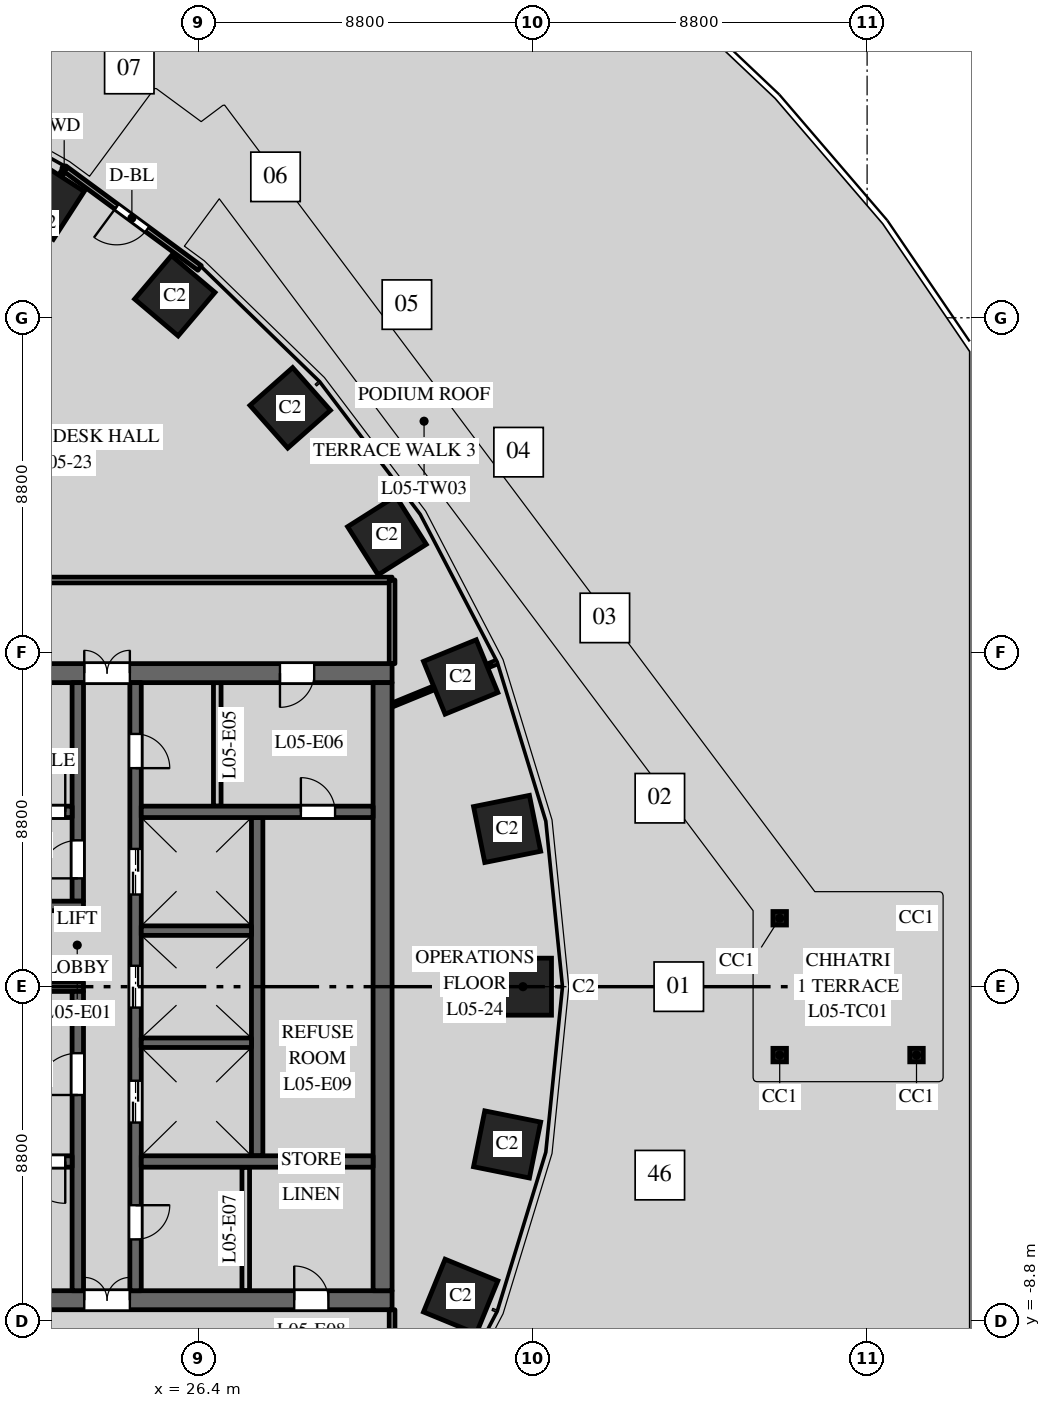
"""IFC4 building model, lengths in metres.
Left out: names, types, materials, properties, quantities, classifications, styles, units other than length and angle.
Written with IfcOpenShell. Run it as: python <this file> out.ifc"""

import sys

from ifc_helpers import new_model, si_unit, direction, frame, frame_2d, origin, origin_2d, place, context, subcontext, project, spatial, rectangle, hollow_circle, extrude, element, fill, save


model = new_model("IFC4")
c1 = context("Model", 3, precision=1e-05, world=origin(), true_north=direction((0.0, 1.0)))
c2 = subcontext(c1, "Body", "Model", "MODEL_VIEW")
j1 = project(units=[si_unit("LENGTHUNIT", "METRE"), si_unit("PLANEANGLEUNIT", "RADIAN")], contexts=[c1])
p1 = place(None, origin())
s1 = spatial("IfcSite", under=j1, at=p1, CompositionType="ELEMENT")
p2 = place(p1, origin())
s2 = spatial("IfcBuilding", under=s1, at=p2, CompositionType="ELEMENT")
p3 = place(p2, frame((0.0, 0.0, 30.5)))
s3 = spatial("IfcBuildingStorey", under=s2, at=p3, CompositionType="ELEMENT", Elevation=30.5)
for number, where, z_axis, x_axis in (
    (1, (34.945, 0.0, 0.0), (0.0, 0.0, 1.0), (0.0, 1.0, 0.0)),
    (2, (34.527, 4.151, 0.0), (0.0, 0.0, 1.0), (-0.197, 0.98, 0.0)),
    (3, (33.305, 8.149, 0.0), (0.0, 0.0, 1.0), (-0.379, 0.925, 0.0)),
    (4, (31.365, 11.871, 0.0), (0.0, 0.0, 1.0), (-0.535, 0.845, 0.0)),
    (5, (28.819, 15.23, 0.0), (0.0, 0.0, 1.0), (-0.663, 0.749, 0.0)),
    (6, (25.783, 18.18, 0.0), (0.0, 0.0, 1.0), (-0.763, 0.646, 0.0)),
    (7, (22.362, 20.7, 0.0), (0.0, 0.0, 1.0), (-0.84, 0.542, 0.0)),
    (8, (33.305, -8.149, 0.0), (0.0, 0.0, 1.0), (0.379, 0.925, 0.0)),
    (9, (34.527, -4.151, 0.0), (0.0, 0.0, 1.0), (0.197, 0.98, 0.0)),
):
    element("IfcColumn", number, at=place(p3, frame(where, z_axis=z_axis, x_axis=x_axis)), inside=s3, PredefinedType="COLUMN", context=c2, shape_type="SweptSolid", body=[
        extrude(rectangle(XDim=1.5, YDim=1.5, at=origin_2d()), origin(), (0.0, 0.0, 1.0), 4.0),
    ])
p4 = place(p3, frame((16.5, 8.25, 0.0), z_axis=(0.0, 0.0, 1.0), x_axis=(1.0, 0.0, 0.0)))
e10 = element("IfcWall", 10, at=p4, inside=s3, PredefinedType="SHEAR", context=c2, shape_type="SweptSolid", body=[
    extrude(rectangle(XDim=15.0, YDim=0.5, at=frame_2d((7.5, 0.0))), origin(), (0.0, 0.0, 1.0), 3.7),
])
p5 = place(p4, frame((6.9, 0.0, 0.0)))
e11 = element("IfcOpeningElement", 11, at=p5, cuts=e10, PredefinedType="OPENING", context=c2, shape_type="SweptSolid", body=[
    extrude(rectangle(XDim=1.2, YDim=2.1, at=frame_2d((0.6, 1.05))), frame((0.0, 0.26, 0.0), z_axis=(0.0, -1.0, 0.0), x_axis=(1.0, 0.0, 0.0)), (0.0, 0.0, 1.0), 0.52),
])
p6 = place(p4, frame((12.05, 0.0, 0.0)))
e12 = element("IfcOpeningElement", 12, at=p6, cuts=e10, PredefinedType="OPENING", context=c2, shape_type="SweptSolid", body=[
    extrude(rectangle(XDim=0.9, YDim=2.1, at=frame_2d((0.45, 1.05))), frame((0.0, 0.26, 0.0), z_axis=(0.0, -1.0, 0.0), x_axis=(1.0, 0.0, 0.0)), (0.0, 0.0, 1.0), 0.52),
])
p7 = place(p3, frame((16.5, -8.25, 0.0), z_axis=(0.0, 0.0, 1.0), x_axis=(1.0, 0.0, 0.0)))
e13 = element("IfcWall", 13, at=p7, inside=s3, PredefinedType="SHEAR", context=c2, shape_type="SweptSolid", body=[
    extrude(rectangle(XDim=15.0, YDim=0.5, at=frame_2d((7.5, 0.0))), origin(), (0.0, 0.0, 1.0), 3.7),
])
p8 = place(p7, frame((6.9, 0.0, 0.0)))
e14 = element("IfcOpeningElement", 14, at=p8, cuts=e13, PredefinedType="OPENING", context=c2, shape_type="SweptSolid", body=[
    extrude(rectangle(XDim=1.2, YDim=2.1, at=frame_2d((0.6, 1.05))), frame((0.0, 0.26, 0.0), z_axis=(0.0, -1.0, 0.0), x_axis=(1.0, 0.0, 0.0)), (0.0, 0.0, 1.0), 0.52),
])
p9 = place(p7, frame((12.425, 0.0, 0.0)))
e15 = element("IfcOpeningElement", 15, at=p9, cuts=e13, PredefinedType="OPENING", context=c2, shape_type="SweptSolid", body=[
    extrude(rectangle(XDim=0.9, YDim=2.1, at=frame_2d((0.45, 1.05))), frame((0.0, 0.26, 0.0), z_axis=(0.0, -1.0, 0.0), x_axis=(1.0, 0.0, 0.0)), (0.0, 0.0, 1.0), 0.52),
])
p10 = place(p3, frame((27.95, -4.45, 0.0), z_axis=(0.0, 0.0, 1.0), x_axis=(0.0, 1.0, 0.0)))
e16 = element("IfcWall", 16, at=p10, inside=s3, PredefinedType="SHEAR", context=c2, shape_type="SweptSolid", body=[
    extrude(rectangle(XDim=8.9, YDim=0.3, at=frame_2d((4.45, 0.0))), origin(), (0.0, 0.0, 1.0), 3.7),
])
p11 = place(p3, frame((24.75, -8.0, 0.0), z_axis=(0.0, 0.0, 1.0), x_axis=(0.0, 1.0, 0.0)))
e17 = element("IfcWall", 17, at=p11, inside=s3, PredefinedType="SHEAR", context=c2, shape_type="SweptSolid", body=[
    extrude(rectangle(XDim=16.0, YDim=0.3, at=frame_2d((8.0, 0.0))), origin(), (0.0, 0.0, 1.0), 3.7),
])
p12 = place(p11, frame((4.425, 0.0, 0.0)))
e18 = element("IfcOpeningElement", 18, at=p12, cuts=e17, PredefinedType="OPENING", context=c2, shape_type="SweptSolid", body=[
    extrude(rectangle(XDim=1.1, YDim=2.1, at=frame_2d((0.55, 1.05))), frame((0.0, 0.16, 0.0), z_axis=(0.0, -1.0, 0.0), x_axis=(1.0, 0.0, 0.0)), (0.0, 0.0, 1.0), 0.32),
])
p13 = place(p11, frame((7.45, 0.0, 0.0)))
e19 = element("IfcOpeningElement", 19, at=p13, cuts=e17, PredefinedType="OPENING", context=c2, shape_type="SweptSolid", body=[
    extrude(rectangle(XDim=1.1, YDim=2.1, at=frame_2d((0.55, 1.05))), frame((0.0, 0.16, 0.0), z_axis=(0.0, -1.0, 0.0), x_axis=(1.0, 0.0, 0.0)), (0.0, 0.0, 1.0), 0.32),
])
p14 = place(p11, frame((10.425, 0.0, 0.0)))
e20 = element("IfcOpeningElement", 20, at=p14, cuts=e17, PredefinedType="OPENING", context=c2, shape_type="SweptSolid", body=[
    extrude(rectangle(XDim=1.2, YDim=2.1, at=frame_2d((0.6, 1.05))), frame((0.0, 0.16, 0.0), z_axis=(0.0, -1.0, 0.0), x_axis=(1.0, 0.0, 0.0)), (0.0, 0.0, 1.0), 0.32),
])
p15 = place(p11, frame((13.75, 0.0, 0.0)))
e21 = element("IfcOpeningElement", 21, at=p15, cuts=e17, PredefinedType="OPENING", context=c2, shape_type="SweptSolid", body=[
    extrude(rectangle(XDim=0.9, YDim=2.1, at=frame_2d((0.45, 1.05))), frame((0.0, 0.16, 0.0), z_axis=(0.0, -1.0, 0.0), x_axis=(1.0, 0.0, 0.0)), (0.0, 0.0, 1.0), 0.32),
])
p16 = place(p11, frame((1.35, 0.0, 0.0)))
e22 = element("IfcOpeningElement", 22, at=p16, cuts=e17, PredefinedType="OPENING", context=c2, shape_type="SweptSolid", body=[
    extrude(rectangle(XDim=0.9, YDim=2.1, at=frame_2d((0.45, 1.05))), frame((0.0, 0.16, 0.0), z_axis=(0.0, -1.0, 0.0), x_axis=(1.0, 0.0, 0.0)), (0.0, 0.0, 1.0), 0.32),
])
p17 = place(p3, frame((20.1, 0.0, 0.0), z_axis=(0.0, 0.0, 1.0), x_axis=(1.0, 0.0, 0.0)))
e23 = element("IfcWall", 23, at=p17, inside=s3, PredefinedType="SHEAR", context=c2, shape_type="SweptSolid", body=[
    extrude(rectangle(XDim=3.28, YDim=0.25, at=frame_2d((1.64, 0.0))), origin(), (0.0, 0.0, 1.0), 3.7),
])
p18 = place(p3, frame((31.25, -8.0, 0.0), z_axis=(0.0, 0.0, 1.0), x_axis=(0.0, 1.0, 0.0)))
e24 = element("IfcWall", 24, at=p18, inside=s3, PredefinedType="SHEAR", context=c2, shape_type="SweptSolid", body=[
    extrude(rectangle(XDim=16.0, YDim=0.5, at=frame_2d((8.0, 0.0))), origin(), (0.0, 0.0, 1.0), 3.7),
])
p19 = place(p3, frame((24.9, 4.6, 0.0), z_axis=(0.0, 0.0, 1.0), x_axis=(1.0, 0.0, 0.0)))
e25 = element("IfcWall", 25, at=p19, inside=s3, PredefinedType="SHEAR", context=c2, shape_type="SweptSolid", body=[
    extrude(rectangle(XDim=6.1, YDim=0.3, at=frame_2d((3.05, 0.0))), origin(), (0.0, 0.0, 1.0), 3.7),
])
p20 = place(p19, frame((4.2, 0.0, 0.0)))
e26 = element("IfcOpeningElement", 26, at=p20, cuts=e25, PredefinedType="OPENING", context=c2, shape_type="SweptSolid", body=[
    extrude(rectangle(XDim=0.9, YDim=2.1, at=frame_2d((0.45, 1.05))), frame((0.0, 0.16, 0.0), z_axis=(0.0, -1.0, 0.0), x_axis=(1.0, 0.0, 0.0)), (0.0, 0.0, 1.0), 0.32),
])
for number, where, z_axis, x_axis in (
    (27, (26.9, 4.75, 0.0), (0.0, 0.0, 1.0), (0.0, 1.0, 0.0)),
    (28, (27.65, -8.0, 0.0), (0.0, 0.0, 1.0), (0.0, 1.0, 0.0)),
):
    element("IfcWall", number, at=place(p3, frame(where, z_axis=z_axis, x_axis=x_axis)), inside=s3, PredefinedType="PARTITIONING", context=c2, shape_type="SweptSolid", body=[
        extrude(rectangle(XDim=3.25, YDim=0.2, at=frame_2d((1.625, 0.0))), origin(), (0.0, 0.0, 1.0), 3.7),
    ])
p21 = place(p3, frame((24.9, -4.6, 0.0), z_axis=(0.0, 0.0, 1.0), x_axis=(1.0, 0.0, 0.0)))
e29 = element("IfcWall", 29, at=p21, inside=s3, PredefinedType="SHEAR", context=c2, shape_type="SweptSolid", body=[
    extrude(rectangle(XDim=6.1, YDim=0.3, at=frame_2d((3.05, 0.0))), origin(), (0.0, 0.0, 1.0), 3.7),
])
for number, where, z_axis, x_axis in (
    (30, (24.9, -1.475, 0.0), (0.0, 0.0, 1.0), (1.0, 0.0, 0.0)),
    (31, (24.9, 1.475, 0.0), (0.0, 0.0, 1.0), (1.0, 0.0, 0.0)),
):
    element("IfcWall", number, at=place(p3, frame(where, z_axis=z_axis, x_axis=x_axis)), inside=s3, PredefinedType="SHEAR", context=c2, shape_type="SweptSolid", body=[
        extrude(rectangle(XDim=2.9, YDim=0.25, at=frame_2d((1.45, 0.0))), origin(), (0.0, 0.0, 1.0), 3.7),
    ])
p22 = place(p3, frame((23.23, 2.25, 0.0), z_axis=(0.0, 0.0, 1.0), x_axis=(0.0, 1.0, 0.0)))
e32 = element("IfcWall", 32, at=p22, inside=s3, PredefinedType="SHEAR", context=c2, shape_type="SweptSolid", body=[
    extrude(rectangle(XDim=5.75, YDim=0.3, at=frame_2d((2.875, 0.0))), origin(), (0.0, 0.0, 1.0), 3.7),
])
p23 = place(p22, frame((0.6, 0.0, 0.0)))
e33 = element("IfcOpeningElement", 33, at=p23, cuts=e32, PredefinedType="OPENING", context=c2, shape_type="SweptSolid", body=[
    extrude(rectangle(XDim=1.0, YDim=2.1, at=frame_2d((0.5, 1.05))), frame((0.0, 0.16, 0.0), z_axis=(0.0, -1.0, 0.0), x_axis=(1.0, 0.0, 0.0)), (0.0, 0.0, 1.0), 0.32),
])
p24 = place(p3, frame((23.23, -8.0, 0.0), z_axis=(0.0, 0.0, 1.0), x_axis=(0.0, 1.0, 0.0)))
e34 = element("IfcWall", 34, at=p24, inside=s3, PredefinedType="SHEAR", context=c2, shape_type="SweptSolid", body=[
    extrude(rectangle(XDim=7.875, YDim=0.3, at=frame_2d((3.938, 0.0))), origin(), (0.0, 0.0, 1.0), 3.7),
])
p25 = place(p24, frame((5.15, 0.0, 0.0)))
e35 = element("IfcOpeningElement", 35, at=p25, cuts=e34, PredefinedType="OPENING", context=c2, shape_type="SweptSolid", body=[
    extrude(rectangle(XDim=1.1, YDim=2.1, at=frame_2d((0.55, 1.05))), frame((0.0, 0.16, 0.0), z_axis=(0.0, -1.0, 0.0), x_axis=(1.0, 0.0, 0.0)), (0.0, 0.0, 1.0), 0.32),
])
p26 = place(p3, frame((16.9, 4.6, 0.0), z_axis=(0.0, 0.0, 1.0), x_axis=(1.0, 0.0, 0.0)))
e36 = element("IfcWall", 36, at=p26, inside=s3, PredefinedType="SHEAR", context=c2, shape_type="SweptSolid", body=[
    extrude(rectangle(XDim=6.18, YDim=0.3, at=frame_2d((3.09, 0.0))), origin(), (0.0, 0.0, 1.0), 3.7),
])
p27 = place(p26, frame((4.9, 0.0, 0.0)))
e37 = element("IfcOpeningElement", 37, at=p27, cuts=e36, PredefinedType="OPENING", context=c2, shape_type="SweptSolid", body=[
    extrude(rectangle(XDim=1.1, YDim=2.1, at=frame_2d((0.55, 1.05))), frame((0.0, 0.16, 0.0), z_axis=(0.0, -1.0, 0.0), x_axis=(1.0, 0.0, 0.0)), (0.0, 0.0, 1.0), 0.32),
])
p28 = place(p3, frame((16.9, -4.6, 0.0), z_axis=(0.0, 0.0, 1.0), x_axis=(1.0, 0.0, 0.0)))
e38 = element("IfcWall", 38, at=p28, inside=s3, PredefinedType="SHEAR", context=c2, shape_type="SweptSolid", body=[
    extrude(rectangle(XDim=6.18, YDim=0.3, at=frame_2d((3.09, 0.0))), origin(), (0.0, 0.0, 1.0), 3.7),
])
p29 = place(p28, frame((4.9, 0.0, 0.0)))
e39 = element("IfcOpeningElement", 39, at=p29, cuts=e38, PredefinedType="OPENING", context=c2, shape_type="SweptSolid", body=[
    extrude(rectangle(XDim=1.1, YDim=2.1, at=frame_2d((0.55, 1.05))), frame((0.0, 0.16, 0.0), z_axis=(0.0, -1.0, 0.0), x_axis=(1.0, 0.0, 0.0)), (0.0, 0.0, 1.0), 0.32),
])
p30 = place(p3, frame((20.85, 2.125, 0.0), z_axis=(0.0, 0.0, 1.0), x_axis=(1.0, 0.0, 0.0)))
e40 = element("IfcWall", 40, at=p30, inside=s3, PredefinedType="SHEAR", context=c2, shape_type="SweptSolid", body=[
    extrude(rectangle(XDim=2.53, YDim=0.25, at=frame_2d((1.265, 0.0))), origin(), (0.0, 0.0, 1.0), 3.7),
])
p31 = place(p3, frame((26.435, 18.911, 0.0), z_axis=(0.0, 0.0, 1.0), x_axis=(-0.805154287598, 0.593065403782, 0.0)))
e41 = element("IfcWall", 41, at=p31, inside=s3, PredefinedType="STANDARD", context=c2, shape_type="SweptSolid", body=[
    extrude(rectangle(XDim=4.425, YDim=0.15, at=frame_2d((2.212, 0.0))), origin(), (0.0, 0.0, 1.0), 3.7),
])
p32 = place(p31, frame((1.712, 0.0, 0.0)))
e42 = element("IfcOpeningElement", 42, at=p32, cuts=e41, PredefinedType="OPENING", context=c2, shape_type="SweptSolid", body=[
    extrude(rectangle(XDim=1.0, YDim=2.4, at=frame_2d((0.5, 1.2))), frame((0.0, 0.085, 0.0), z_axis=(0.0, -1.0, 0.0), x_axis=(1.0, 0.0, 0.0)), (0.0, 0.0, 1.0), 0.17),
])
for number, where, z_axis, x_axis in (
    (43, (41.7, -1.8, 0.45), (0.0, 0.0, 1.0), (1.0, 0.0, 0.0)),
    (44, (45.3, -1.8, 0.45), (0.0, 0.0, 1.0), (1.0, 0.0, 0.0)),
    (45, (45.3, 1.8, 0.45), (0.0, 0.0, 1.0), (1.0, 0.0, 0.0)),
    (46, (41.7, 1.8, 0.45), (0.0, 0.0, 1.0), (1.0, 0.0, 0.0)),
):
    element("IfcColumn", number, at=place(p3, frame(where, z_axis=z_axis, x_axis=x_axis)), inside=s3, PredefinedType="COLUMN", context=c2, shape_type="SweptSolid", body=[
        extrude(hollow_circle(Radius=0.178, WallThickness=0.016, at=origin_2d()), origin(), (0.0, 0.0, 1.0), 3.55),
    ])
p33 = place(p3, frame((16.5, 10.7, 0.0), z_axis=(0.0, 0.0, 1.0), x_axis=(1.0, 0.0, 0.0)))
e47 = element("IfcWall", 47, at=p33, inside=s3, PredefinedType="PARTITIONING", context=c2, shape_type="SweptSolid", body=[
    extrude(rectangle(XDim=15.0, YDim=0.15, at=frame_2d((7.5, 0.0))), origin(), (0.0, 0.0, 1.0), 2.75),
])
p34 = place(p33, frame((0.6, 0.0, 0.0)))
e48 = element("IfcOpeningElement", 48, at=p34, cuts=e47, PredefinedType="OPENING", context=c2, shape_type="SweptSolid", body=[
    extrude(rectangle(XDim=1.0, YDim=2.1, at=frame_2d((0.5, 1.05))), frame((0.0, 0.085, 0.0), z_axis=(0.0, -1.0, 0.0), x_axis=(1.0, 0.0, 0.0)), (0.0, 0.0, 1.0), 0.17),
])
p35 = place(p3, frame((16.575, 11.733, 0.0), z_axis=(0.0, 0.0, 1.0), x_axis=(0.54222594427, 0.840232720953, 0.0)))
e49 = element("IfcWall", 49, at=p35, inside=s3, PredefinedType="PARTITIONING", context=c2, shape_type="SweptSolid", body=[
    extrude(rectangle(XDim=11.674, YDim=0.1, at=frame_2d((5.837, 0.0))), origin(), (0.0, 0.0, 1.0), 3.7),
])
p36 = place(p3, frame((31.5, -10.7, 0.0), z_axis=(0.0, 0.0, 1.0), x_axis=(0.0, 1.0, 0.0)))
e50 = element("IfcWall", 50, at=p36, inside=s3, PredefinedType="PARTITIONING", context=c2, shape_type="SweptSolid", body=[
    extrude(rectangle(XDim=2.2, YDim=0.15, at=frame_2d((1.1, 0.0))), origin(), (0.0, 0.0, 1.0), 2.85),
])
p37 = place(p3, frame((31.5, 7.41, 0.0), z_axis=(0.0, 0.0, 1.0), x_axis=(0.925344112436, 0.379128307542, 0.0)))
e51 = element("IfcWall", 51, at=p37, inside=s3, PredefinedType="PARTITIONING", context=c2, shape_type="SweptSolid", body=[
    extrude(rectangle(XDim=2.954, YDim=0.1, at=frame_2d((1.477, 0.0))), origin(), (0.0, 0.0, 1.0), 3.7),
])
p38 = place(p3, frame((31.5, 8.5, 0.0), z_axis=(0.0, 0.0, 1.0), x_axis=(0.0, 1.0, 0.0)))
e52 = element("IfcWall", 52, at=p38, inside=s3, PredefinedType="PARTITIONING", context=c2, shape_type="SweptSolid", body=[
    extrude(rectangle(XDim=2.2, YDim=0.15, at=frame_2d((1.1, 0.0))), origin(), (0.0, 0.0, 1.0), 2.85),
])
p39 = place(p12, origin())
e53 = element("IfcDoor", 53, at=p39, inside=s3, OperationType="DOUBLE_DOOR_SLIDING", PredefinedType="DOOR", context=c2, shape_type="SweptSolid", body=[
    extrude(rectangle(XDim=1.1, YDim=2.1, at=frame_2d((0.55, 1.05))), frame((0.0, 0.025, 0.0), z_axis=(0.0, -1.0, 0.0), x_axis=(1.0, 0.0, 0.0)), (0.0, 0.0, 1.0), 0.05),
])
fill(e18, e53)
p40 = place(p13, origin())
e54 = element("IfcDoor", 54, at=p40, inside=s3, OperationType="DOUBLE_DOOR_SLIDING", PredefinedType="DOOR", context=c2, shape_type="SweptSolid", body=[
    extrude(rectangle(XDim=1.1, YDim=2.1, at=frame_2d((0.55, 1.05))), frame((0.0, 0.025, 0.0), z_axis=(0.0, -1.0, 0.0), x_axis=(1.0, 0.0, 0.0)), (0.0, 0.0, 1.0), 0.05),
])
fill(e19, e54)
p41 = place(p14, origin())
e55 = element("IfcDoor", 55, at=p41, inside=s3, OperationType="DOUBLE_DOOR_SLIDING", PredefinedType="DOOR", context=c2, shape_type="SweptSolid", body=[
    extrude(rectangle(XDim=1.2, YDim=2.1, at=frame_2d((0.6, 1.05))), frame((0.0, 0.025, 0.0), z_axis=(0.0, -1.0, 0.0), x_axis=(1.0, 0.0, 0.0)), (0.0, 0.0, 1.0), 0.05),
])
fill(e20, e55)
p42 = place(p27, origin())
e56 = element("IfcDoor", 56, at=p42, inside=s3, OperationType="SINGLE_SWING_LEFT", PredefinedType="DOOR", context=c2, shape_type="SweptSolid", body=[
    extrude(rectangle(XDim=1.1, YDim=2.1, at=frame_2d((0.55, 1.05))), frame((0.0, 0.025, 0.0), z_axis=(0.0, -1.0, 0.0), x_axis=(1.0, 0.0, 0.0)), (0.0, 0.0, 1.0), 0.05),
])
fill(e37, e56)
p43 = place(p29, origin())
e57 = element("IfcDoor", 57, at=p43, inside=s3, OperationType="SINGLE_SWING_RIGHT", PredefinedType="DOOR", context=c2, shape_type="SweptSolid", body=[
    extrude(rectangle(XDim=1.1, YDim=2.1, at=frame_2d((0.55, 1.05))), frame((0.0, 0.025, 0.0), z_axis=(0.0, -1.0, 0.0), x_axis=(1.0, 0.0, 0.0)), (0.0, 0.0, 1.0), 0.05),
])
fill(e39, e57)
p44 = place(p25, origin())
e58 = element("IfcDoor", 58, at=p44, inside=s3, OperationType="SINGLE_SWING_RIGHT", PredefinedType="DOOR", context=c2, shape_type="SweptSolid", body=[
    extrude(rectangle(XDim=1.1, YDim=2.1, at=frame_2d((0.55, 1.05))), frame((0.0, 0.025, 0.0), z_axis=(0.0, -1.0, 0.0), x_axis=(1.0, 0.0, 0.0)), (0.0, 0.0, 1.0), 0.05),
])
fill(e35, e58)
p45 = place(p23, origin())
e59 = element("IfcDoor", 59, at=p45, inside=s3, OperationType="SINGLE_SWING_RIGHT", PredefinedType="DOOR", context=c2, shape_type="SweptSolid", body=[
    extrude(rectangle(XDim=1.0, YDim=2.1, at=frame_2d((0.5, 1.05))), frame((0.0, 0.025, 0.0), z_axis=(0.0, -1.0, 0.0), x_axis=(1.0, 0.0, 0.0)), (0.0, 0.0, 1.0), 0.05),
])
fill(e33, e59)
p46 = place(p5, origin())
e60 = element("IfcDoor", 60, at=p46, inside=s3, OperationType="DOUBLE_DOOR_DOUBLE_SWING", PredefinedType="DOOR", context=c2, shape_type="SweptSolid", body=[
    extrude(rectangle(XDim=1.2, YDim=2.1, at=frame_2d((0.6, 1.05))), frame((0.0, 0.025, 0.0), z_axis=(0.0, -1.0, 0.0), x_axis=(1.0, 0.0, 0.0)), (0.0, 0.0, 1.0), 0.05),
])
fill(e11, e60)
p47 = place(p8, origin())
e61 = element("IfcDoor", 61, at=p47, inside=s3, OperationType="DOUBLE_DOOR_DOUBLE_SWING", PredefinedType="DOOR", context=c2, shape_type="SweptSolid", body=[
    extrude(rectangle(XDim=1.2, YDim=2.1, at=frame_2d((0.6, 1.05))), frame((0.0, 0.025, 0.0), z_axis=(0.0, -1.0, 0.0), x_axis=(1.0, 0.0, 0.0)), (0.0, 0.0, 1.0), 0.05),
])
fill(e14, e61)
p48 = place(p15, origin())
e62 = element("IfcDoor", 62, at=p48, inside=s3, OperationType="SINGLE_SWING_LEFT", PredefinedType="DOOR", context=c2, shape_type="SweptSolid", body=[
    extrude(rectangle(XDim=0.9, YDim=2.1, at=frame_2d((0.45, 1.05))), frame((0.0, 0.025, 0.0), z_axis=(0.0, -1.0, 0.0), x_axis=(1.0, 0.0, 0.0)), (0.0, 0.0, 1.0), 0.05),
])
fill(e21, e62)
p49 = place(p6, origin())
e63 = element("IfcDoor", 63, at=p49, inside=s3, OperationType="SINGLE_SWING_LEFT", PredefinedType="DOOR", context=c2, shape_type="SweptSolid", body=[
    extrude(rectangle(XDim=0.9, YDim=2.1, at=frame_2d((0.45, 1.05))), frame((0.0, 0.025, 0.0), z_axis=(0.0, -1.0, 0.0), x_axis=(1.0, 0.0, 0.0)), (0.0, 0.0, 1.0), 0.05),
])
fill(e12, e63)
p50 = place(p16, origin())
e64 = element("IfcDoor", 64, at=p50, inside=s3, OperationType="SINGLE_SWING_RIGHT", PredefinedType="DOOR", context=c2, shape_type="SweptSolid", body=[
    extrude(rectangle(XDim=0.9, YDim=2.1, at=frame_2d((0.45, 1.05))), frame((0.0, 0.025, 0.0), z_axis=(0.0, -1.0, 0.0), x_axis=(1.0, 0.0, 0.0)), (0.0, 0.0, 1.0), 0.05),
])
fill(e22, e64)
p51 = place(p9, origin())
e65 = element("IfcDoor", 65, at=p51, inside=s3, OperationType="SINGLE_SWING_RIGHT", PredefinedType="DOOR", context=c2, shape_type="SweptSolid", body=[
    extrude(rectangle(XDim=0.9, YDim=2.1, at=frame_2d((0.45, 1.05))), frame((0.0, 0.025, 0.0), z_axis=(0.0, -1.0, 0.0), x_axis=(1.0, 0.0, 0.0)), (0.0, 0.0, 1.0), 0.05),
])
fill(e15, e65)
p52 = place(p20, origin())
e66 = element("IfcDoor", 66, at=p52, inside=s3, OperationType="SINGLE_SWING_RIGHT", PredefinedType="DOOR", context=c2, shape_type="SweptSolid", body=[
    extrude(rectangle(XDim=0.9, YDim=2.1, at=frame_2d((0.45, 1.05))), frame((0.0, 0.025, 0.0), z_axis=(0.0, -1.0, 0.0), x_axis=(1.0, 0.0, 0.0)), (0.0, 0.0, 1.0), 0.05),
])
fill(e26, e66)
p53 = place(p32, origin())
e67 = element("IfcDoor", 67, at=p53, inside=s3, OperationType="SINGLE_SWING_RIGHT", PredefinedType="DOOR", context=c2, shape_type="SweptSolid", body=[
    extrude(rectangle(XDim=1.0, YDim=2.4, at=frame_2d((0.5, 1.2))), frame((0.0, 0.025, 0.0), z_axis=(0.0, -1.0, 0.0), x_axis=(1.0, 0.0, 0.0)), (0.0, 0.0, 1.0), 0.05),
])
fill(e42, e67)
save(model, sys.argv[1])
